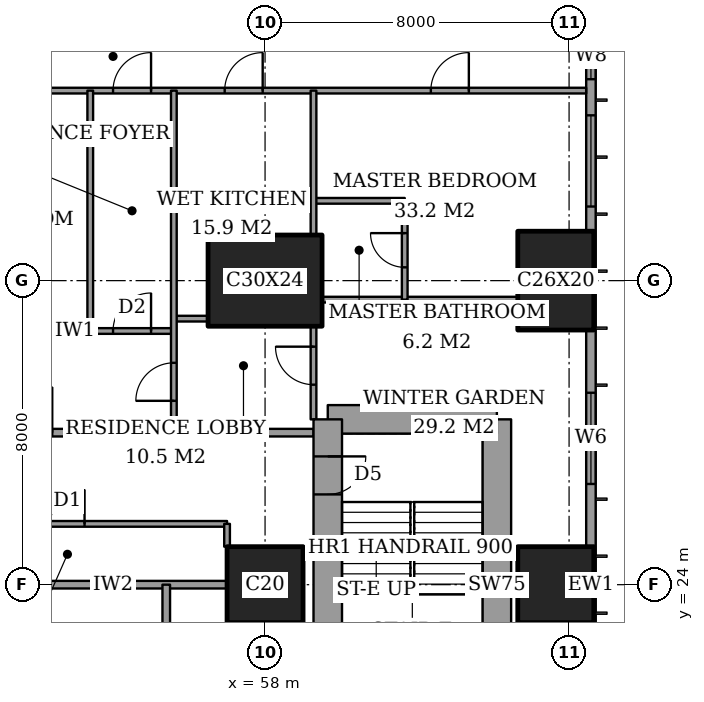
"""IFC4 building model, lengths in metres.
Left out: names, types, materials, properties, quantities, classifications, styles, units other than length and angle.
Written with IfcOpenShell. Run it as: python <this file> out.ifc"""

import sys

from ifc_helpers import new_model, si_unit, direction, frame, frame_2d, origin, origin_2d, place, context, subcontext, project, spatial, rectangle, extrude, element, fill, save


model = new_model("IFC4")
c1 = context("Model", 3, precision=1e-05, world=origin(), true_north=direction((0.0, 1.0)))
c2 = subcontext(c1, "Body", "Model", "MODEL_VIEW")
j1 = project(units=[si_unit("LENGTHUNIT", "METRE"), si_unit("PLANEANGLEUNIT", "RADIAN")], contexts=[c1])
p1 = place(None, origin())
s1 = spatial("IfcSite", under=j1, at=p1, CompositionType="ELEMENT")
p2 = place(p1, origin())
s2 = spatial("IfcBuilding", under=s1, at=p2, CompositionType="ELEMENT")
p3 = place(p2, frame((0.0, 0.0, 51.2)))
s3 = spatial("IfcBuildingStorey", under=s2, at=p3, CompositionType="ELEMENT", Elevation=51.2)
p4 = place(p3, frame((58.0, 24.0, 0.0), z_axis=(0.0, 0.0, 1.0), x_axis=(1.0, 0.0, 0.0)))
e1 = element("IfcColumn", 1, at=p4, inside=s3, PredefinedType="COLUMN", context=c2, shape_type="SweptSolid", body=[
    extrude(rectangle(XDim=2.0, YDim=2.0, at=origin_2d()), origin(), (0.0, 0.0, 1.0), 3.6),
])
p5 = place(p3, frame((58.0, 32.0, 0.0), z_axis=(0.0, 0.0, 1.0), x_axis=(1.0, 0.0, 0.0)))
e2 = element("IfcColumn", 2, at=p5, inside=s3, PredefinedType="COLUMN", context=c2, shape_type="SweptSolid", body=[
    extrude(rectangle(XDim=3.0, YDim=2.4, at=origin_2d()), origin(), (0.0, 0.0, 1.0), 3.6),
])
p6 = place(p3, frame((65.65, 24.0, 0.0), z_axis=(0.0, 0.0, 1.0), x_axis=(1.0, 0.0, 0.0)))
e3 = element("IfcColumn", 3, at=p6, inside=s3, PredefinedType="COLUMN", context=c2, shape_type="SweptSolid", body=[
    extrude(rectangle(XDim=2.0, YDim=2.0, at=origin_2d()), origin(), (0.0, 0.0, 1.0), 3.6),
])
p7 = place(p3, frame((65.65, 32.0, 0.0), z_axis=(0.0, 0.0, 1.0), x_axis=(0.0, 1.0, 0.0)))
e4 = element("IfcColumn", 4, at=p7, inside=s3, PredefinedType="COLUMN", context=c2, shape_type="SweptSolid", body=[
    extrude(rectangle(XDim=2.6, YDim=2.0, at=origin_2d()), origin(), (0.0, 0.0, 1.0), 3.6),
])
p8 = place(p3, frame((64.1, 19.65, 0.0), z_axis=(0.0, 0.0, 1.0), x_axis=(0.0, 1.0, 0.0)))
e5 = element("IfcWall", 5, at=p8, inside=s3, PredefinedType="SHEAR", context=c2, shape_type="SweptSolid", body=[
    extrude(rectangle(XDim=8.7, YDim=0.75, at=frame_2d((4.35, 0.0))), origin(), (0.0, 0.0, 1.0), 3.6),
])
p9 = place(p3, frame((64.1, 28.35, 0.0), z_axis=(0.0, 0.0, 1.0), x_axis=(-1.0, 0.0, 0.0)))
e6 = element("IfcWall", 6, at=p9, inside=s3, PredefinedType="SHEAR", context=c2, shape_type="SweptSolid", body=[
    extrude(rectangle(XDim=4.45, YDim=0.75, at=frame_2d((2.225, 0.0))), origin(), (0.0, 0.0, 1.0), 3.6),
])
p10 = place(p3, frame((59.65, 28.35, 0.0), z_axis=(0.0, 0.0, 1.0), x_axis=(0.0, -1.0, 0.0)))
e7 = element("IfcWall", 7, at=p10, inside=s3, PredefinedType="SHEAR", context=c2, shape_type="SweptSolid", body=[
    extrude(rectangle(XDim=8.7, YDim=0.75, at=frame_2d((4.35, 0.0))), origin(), (0.0, 0.0, 1.0), 3.6),
])
p11 = place(p10, frame((0.975, 0.0, 0.0)))
e8 = element("IfcOpeningElement", 8, at=p11, cuts=e7, PredefinedType="OPENING", context=c2, shape_type="SweptSolid", body=[
    extrude(rectangle(XDim=1.0, YDim=2.1, at=frame_2d((0.5, 1.05))), frame((0.0, 0.385, 0.0), z_axis=(0.0, -1.0, 0.0), x_axis=(1.0, 0.0, 0.0)), (0.0, 0.0, 1.0), 0.77),
])
p12 = place(p3, frame((66.575, 3.175, 0.0), z_axis=(0.0, 0.0, 1.0), x_axis=(0.0, 1.0, 0.0)))
e9 = element("IfcWall", 9, at=p12, inside=s3, PredefinedType="SOLIDWALL", context=c2, shape_type="SweptSolid", body=[
    extrude(rectangle(XDim=41.65, YDim=0.25, at=frame_2d((20.825, 0.0))), origin(), (0.0, 0.0, 1.0), 3.6),
])
p13 = place(p12, frame((0.775, 0.0, 0.6)))
e10 = element("IfcOpeningElement", 10, at=p13, cuts=e9, PredefinedType="OPENING", context=c2, shape_type="SweptSolid", body=[
    extrude(rectangle(XDim=2.4, YDim=2.0, at=frame_2d((1.2, 1.0))), frame((0.0, 0.135, 0.0), z_axis=(0.0, -1.0, 0.0), x_axis=(1.0, 0.0, 0.0)), (0.0, 0.0, 1.0), 0.27),
])
p14 = place(p12, frame((6.125, 0.0, 0.6)))
e11 = element("IfcOpeningElement", 11, at=p14, cuts=e9, PredefinedType="OPENING", context=c2, shape_type="SweptSolid", body=[
    extrude(rectangle(XDim=1.2, YDim=2.0, at=frame_2d((0.6, 1.0))), frame((0.0, 0.135, 0.0), z_axis=(0.0, -1.0, 0.0), x_axis=(1.0, 0.0, 0.0)), (0.0, 0.0, 1.0), 0.27),
])
p15 = place(p12, frame((8.375, 0.0, 0.6)))
e12 = element("IfcOpeningElement", 12, at=p15, cuts=e9, PredefinedType="OPENING", context=c2, shape_type="SweptSolid", body=[
    extrude(rectangle(XDim=2.4, YDim=2.0, at=frame_2d((1.2, 1.0))), frame((0.0, 0.135, 0.0), z_axis=(0.0, -1.0, 0.0), x_axis=(1.0, 0.0, 0.0)), (0.0, 0.0, 1.0), 0.27),
])
p16 = place(p12, frame((15.775, 0.0, 0.6)))
e13 = element("IfcOpeningElement", 13, at=p16, cuts=e9, PredefinedType="OPENING", context=c2, shape_type="SweptSolid", body=[
    extrude(rectangle(XDim=2.4, YDim=2.0, at=frame_2d((1.2, 1.0))), frame((0.0, 0.135, 0.0), z_axis=(0.0, -1.0, 0.0), x_axis=(1.0, 0.0, 0.0)), (0.0, 0.0, 1.0), 0.27),
])
p17 = place(p12, frame((23.475, 0.0, 0.6)))
e14 = element("IfcOpeningElement", 14, at=p17, cuts=e9, PredefinedType="OPENING", context=c2, shape_type="SweptSolid", body=[
    extrude(rectangle(XDim=2.4, YDim=2.0, at=frame_2d((1.2, 1.0))), frame((0.0, 0.135, 0.0), z_axis=(0.0, -1.0, 0.0), x_axis=(1.0, 0.0, 0.0)), (0.0, 0.0, 1.0), 0.27),
])
p18 = place(p12, frame((30.775, 0.0, 0.6)))
e15 = element("IfcOpeningElement", 15, at=p18, cuts=e9, PredefinedType="OPENING", context=c2, shape_type="SweptSolid", body=[
    extrude(rectangle(XDim=2.4, YDim=2.0, at=frame_2d((1.2, 1.0))), frame((0.0, 0.135, 0.0), z_axis=(0.0, -1.0, 0.0), x_axis=(1.0, 0.0, 0.0)), (0.0, 0.0, 1.0), 0.27),
])
p19 = place(p12, frame((34.125, 0.0, 0.6)))
e16 = element("IfcOpeningElement", 16, at=p19, cuts=e9, PredefinedType="OPENING", context=c2, shape_type="SweptSolid", body=[
    extrude(rectangle(XDim=1.2, YDim=2.0, at=frame_2d((0.6, 1.0))), frame((0.0, 0.135, 0.0), z_axis=(0.0, -1.0, 0.0), x_axis=(1.0, 0.0, 0.0)), (0.0, 0.0, 1.0), 0.27),
])
p20 = place(p12, frame((38.475, 0.0, 0.6)))
e17 = element("IfcOpeningElement", 17, at=p20, cuts=e9, PredefinedType="OPENING", context=c2, shape_type="SweptSolid", body=[
    extrude(rectangle(XDim=2.4, YDim=2.0, at=frame_2d((1.2, 1.0))), frame((0.0, 0.135, 0.0), z_axis=(0.0, -1.0, 0.0), x_axis=(1.0, 0.0, 0.0)), (0.0, 0.0, 1.0), 0.27),
])
p21 = place(p3, frame((51.0, 24.0, 0.0), z_axis=(0.0, 0.0, 1.0), x_axis=(1.0, 0.0, 0.0)))
e18 = element("IfcWall", 18, at=p21, inside=s3, PredefinedType="PARTITIONING", context=c2, shape_type="SweptSolid", body=[
    extrude(rectangle(XDim=6.0, YDim=0.2, at=frame_2d((3.0, 0.0))), origin(), (0.0, 0.0, 1.0), 3.35),
])
p22 = place(p3, frame((48.6, 25.6, 0.0), z_axis=(0.0, 0.0, 1.0), x_axis=(1.0, 0.0, 0.0)))
e19 = element("IfcWall", 19, at=p22, inside=s3, PredefinedType="PARTITIONING", context=c2, shape_type="SweptSolid", body=[
    extrude(rectangle(XDim=8.4, YDim=0.15, at=frame_2d((4.2, 0.0))), origin(), (0.0, 0.0, 1.0), 3.35),
])
p23 = place(p22, frame((3.75, 0.0, 0.0)))
e20 = element("IfcOpeningElement", 20, at=p23, cuts=e19, PredefinedType="OPENING", context=c2, shape_type="SweptSolid", body=[
    extrude(rectangle(XDim=0.9, YDim=2.1, at=frame_2d((0.45, 1.05))), frame((0.0, 0.085, 0.0), z_axis=(0.0, -1.0, 0.0), x_axis=(1.0, 0.0, 0.0)), (0.0, 0.0, 1.0), 0.17),
])
p24 = place(p3, frame((42.0, 28.0, 0.0), z_axis=(0.0, 0.0, 1.0), x_axis=(1.0, 0.0, 0.0)))
e21 = element("IfcWall", 21, at=p24, inside=s3, PredefinedType="PARTITIONING", context=c2, shape_type="SweptSolid", body=[
    extrude(rectangle(XDim=17.275, YDim=0.2, at=frame_2d((8.637, 0.0))), origin(), (0.0, 0.0, 1.0), 3.35),
])
p25 = place(p24, frame((9.2, 0.0, 0.0)))
e22 = element("IfcOpeningElement", 22, at=p25, cuts=e21, PredefinedType="OPENING", context=c2, shape_type="SweptSolid", body=[
    extrude(rectangle(XDim=1.2, YDim=2.4, at=frame_2d((0.6, 1.2))), frame((0.0, 0.11, 0.0), z_axis=(0.0, -1.0, 0.0), x_axis=(1.0, 0.0, 0.0)), (0.0, 0.0, 1.0), 0.22),
])
p26 = place(p3, frame((51.6, 30.675, 0.0), z_axis=(0.0, 0.0, 1.0), x_axis=(1.0, 0.0, 0.0)))
e23 = element("IfcWall", 23, at=p26, inside=s3, PredefinedType="PARTITIONING", context=c2, shape_type="SweptSolid", body=[
    extrude(rectangle(XDim=4.0, YDim=0.15, at=frame_2d((2.0, 0.0))), origin(), (0.0, 0.0, 1.0), 3.35),
])
p27 = place(p26, frame((2.4, 0.0, 0.0)))
e24 = element("IfcOpeningElement", 24, at=p27, cuts=e23, PredefinedType="OPENING", context=c2, shape_type="SweptSolid", body=[
    extrude(rectangle(XDim=1.0, YDim=2.1, at=frame_2d((0.5, 1.05))), frame((0.0, 0.085, 0.0), z_axis=(0.0, -1.0, 0.0), x_axis=(1.0, 0.0, 0.0)), (0.0, 0.0, 1.0), 0.17),
])
p28 = place(p3, frame((55.6, 31.0, 0.0), z_axis=(0.0, 0.0, 1.0), x_axis=(1.0, 0.0, 0.0)))
e25 = element("IfcWall", 25, at=p28, inside=s3, PredefinedType="PARTITIONING", context=c2, shape_type="SweptSolid", body=[
    extrude(rectangle(XDim=0.9, YDim=0.15, at=frame_2d((0.45, 0.0))), origin(), (0.0, 0.0, 1.0), 3.35),
])
p29 = place(p3, frame((59.5, 31.5, 0.0), z_axis=(0.0, 0.0, 1.0), x_axis=(1.0, 0.0, 0.0)))
e26 = element("IfcWall", 26, at=p29, inside=s3, PredefinedType="PARTITIONING", context=c2, shape_type="SweptSolid", body=[
    extrude(rectangle(XDim=5.15, YDim=0.15, at=frame_2d((2.575, 0.0))), origin(), (0.0, 0.0, 1.0), 3.35),
])
p30 = place(p3, frame((59.275, 34.1, 0.0), z_axis=(0.0, 0.0, 1.0), x_axis=(1.0, 0.0, 0.0)))
e27 = element("IfcWall", 27, at=p30, inside=s3, PredefinedType="PARTITIONING", context=c2, shape_type="SweptSolid", body=[
    extrude(rectangle(XDim=2.4, YDim=0.15, at=frame_2d((1.2, 0.0))), origin(), (0.0, 0.0, 1.0), 3.35),
])
p31 = place(p3, frame((41.439, 37.0, 0.0), z_axis=(0.0, 0.0, 1.0), x_axis=(1.0, 0.0, 0.0)))
e28 = element("IfcWall", 28, at=p31, inside=s3, PredefinedType="PARTITIONING", context=c2, shape_type="SweptSolid", body=[
    extrude(rectangle(XDim=25.011, YDim=0.15, at=frame_2d((12.505, 0.0))), origin(), (0.0, 0.0, 1.0), 3.35),
])
p32 = place(p31, frame((12.561, 0.0, 0.0)))
e29 = element("IfcOpeningElement", 29, at=p32, cuts=e28, PredefinedType="OPENING", context=c2, shape_type="SweptSolid", body=[
    extrude(rectangle(XDim=1.0, YDim=2.1, at=frame_2d((0.5, 1.05))), frame((0.0, 0.085, 0.0), z_axis=(0.0, -1.0, 0.0), x_axis=(1.0, 0.0, 0.0)), (0.0, 0.0, 1.0), 0.17),
])
p33 = place(p31, frame((20.924, 0.0, 0.0)))
e30 = element("IfcOpeningElement", 30, at=p33, cuts=e28, PredefinedType="OPENING", context=c2, shape_type="SweptSolid", body=[
    extrude(rectangle(XDim=1.0, YDim=2.1, at=frame_2d((0.5, 1.05))), frame((0.0, 0.085, 0.0), z_axis=(0.0, -1.0, 0.0), x_axis=(1.0, 0.0, 0.0)), (0.0, 0.0, 1.0), 0.17),
])
p34 = place(p31, frame((15.499, 0.0, 0.0)))
e31 = element("IfcOpeningElement", 31, at=p34, cuts=e28, PredefinedType="OPENING", context=c2, shape_type="SweptSolid", body=[
    extrude(rectangle(XDim=1.0, YDim=2.1, at=frame_2d((0.5, 1.05))), frame((0.0, 0.085, 0.0), z_axis=(0.0, -1.0, 0.0), x_axis=(1.0, 0.0, 0.0)), (0.0, 0.0, 1.0), 0.17),
])
p35 = place(p31, frame((8.761, 0.0, 0.0)))
e32 = element("IfcOpeningElement", 32, at=p35, cuts=e28, PredefinedType="OPENING", context=c2, shape_type="SweptSolid", body=[
    extrude(rectangle(XDim=1.0, YDim=2.1, at=frame_2d((0.5, 1.05))), frame((0.0, 0.085, 0.0), z_axis=(0.0, -1.0, 0.0), x_axis=(1.0, 0.0, 0.0)), (0.0, 0.0, 1.0), 0.17),
])
p36 = place(p31, frame((2.836, 0.0, 0.0)))
e33 = element("IfcOpeningElement", 33, at=p36, cuts=e28, PredefinedType="OPENING", context=c2, shape_type="SweptSolid", body=[
    extrude(rectangle(XDim=1.0, YDim=2.1, at=frame_2d((0.5, 1.05))), frame((0.0, 0.085, 0.0), z_axis=(0.0, -1.0, 0.0), x_axis=(1.0, 0.0, 0.0)), (0.0, 0.0, 1.0), 0.17),
])
p37 = place(p3, frame((53.4, 30.675, 0.0), z_axis=(0.0, 0.0, 1.0), x_axis=(0.0, 1.0, 0.0)))
e34 = element("IfcWall", 34, at=p37, inside=s3, PredefinedType="PARTITIONING", context=c2, shape_type="SweptSolid", body=[
    extrude(rectangle(XDim=6.325, YDim=0.15, at=frame_2d((3.163, 0.0))), origin(), (0.0, 0.0, 1.0), 3.35),
])
p38 = place(p3, frame((55.4, 21.6, 0.0), z_axis=(0.0, 0.0, 1.0), x_axis=(0.0, 1.0, 0.0)))
e35 = element("IfcWall", 35, at=p38, inside=s3, PredefinedType="PARTITIONING", context=c2, shape_type="SweptSolid", body=[
    extrude(rectangle(XDim=2.4, YDim=0.2, at=frame_2d((1.2, 0.0))), origin(), (0.0, 0.0, 1.0), 3.35),
])
p39 = place(p3, frame((55.6, 28.0, 0.0), z_axis=(0.0, 0.0, 1.0), x_axis=(0.0, 1.0, 0.0)))
e36 = element("IfcWall", 36, at=p39, inside=s3, PredefinedType="PARTITIONING", context=c2, shape_type="SweptSolid", body=[
    extrude(rectangle(XDim=9.0, YDim=0.15, at=frame_2d((4.5, 0.0))), origin(), (0.0, 0.0, 1.0), 3.35),
])
p40 = place(p39, frame((0.837, 0.0, 0.0)))
e37 = element("IfcOpeningElement", 37, at=p40, cuts=e36, PredefinedType="OPENING", context=c2, shape_type="SweptSolid", body=[
    extrude(rectangle(XDim=1.0, YDim=2.1, at=frame_2d((0.5, 1.05))), frame((0.0, 0.085, 0.0), z_axis=(0.0, -1.0, 0.0), x_axis=(1.0, 0.0, 0.0)), (0.0, 0.0, 1.0), 0.17),
])
p41 = place(p3, frame((57.0, 25.0, 0.0), z_axis=(0.0, 0.0, 1.0), x_axis=(0.0, 1.0, 0.0)))
e38 = element("IfcWall", 38, at=p41, inside=s3, PredefinedType="PARTITIONING", context=c2, shape_type="SweptSolid", body=[
    extrude(rectangle(XDim=0.6, YDim=0.15, at=frame_2d((0.3, 0.0))), origin(), (0.0, 0.0, 1.0), 3.35),
])
p42 = place(p3, frame((59.275, 28.35, 0.0), z_axis=(0.0, 0.0, 1.0), x_axis=(0.0, 1.0, 0.0)))
e39 = element("IfcWall", 39, at=p42, inside=s3, PredefinedType="PARTITIONING", context=c2, shape_type="SweptSolid", body=[
    extrude(rectangle(XDim=2.45, YDim=0.15, at=frame_2d((1.225, 0.0))), origin(), (0.0, 0.0, 1.0), 3.35),
])
p43 = place(p42, frame((0.913, 0.0, 0.0)))
e40 = element("IfcOpeningElement", 40, at=p43, cuts=e39, PredefinedType="OPENING", context=c2, shape_type="SweptSolid", body=[
    extrude(rectangle(XDim=1.0, YDim=2.1, at=frame_2d((0.5, 1.05))), frame((0.0, 0.085, 0.0), z_axis=(0.0, -1.0, 0.0), x_axis=(1.0, 0.0, 0.0)), (0.0, 0.0, 1.0), 0.17),
])
p44 = place(p3, frame((59.275, 33.2, 0.0), z_axis=(0.0, 0.0, 1.0), x_axis=(0.0, 1.0, 0.0)))
e41 = element("IfcWall", 41, at=p44, inside=s3, PredefinedType="PARTITIONING", context=c2, shape_type="SweptSolid", body=[
    extrude(rectangle(XDim=3.8, YDim=0.15, at=frame_2d((1.9, 0.0))), origin(), (0.0, 0.0, 1.0), 3.35),
])
p45 = place(p3, frame((61.675, 31.5, 0.0), z_axis=(0.0, 0.0, 1.0), x_axis=(0.0, 1.0, 0.0)))
e42 = element("IfcWall", 42, at=p45, inside=s3, PredefinedType="PARTITIONING", context=c2, shape_type="SweptSolid", body=[
    extrude(rectangle(XDim=2.6, YDim=0.15, at=frame_2d((1.3, 0.0))), origin(), (0.0, 0.0, 1.0), 3.35),
])
p46 = place(p45, frame((0.85, 0.0, 0.0)))
e43 = element("IfcOpeningElement", 43, at=p46, cuts=e42, PredefinedType="OPENING", context=c2, shape_type="SweptSolid", body=[
    extrude(rectangle(XDim=0.9, YDim=2.1, at=frame_2d((0.45, 1.05))), frame((0.0, 0.085, 0.0), z_axis=(0.0, -1.0, 0.0), x_axis=(1.0, 0.0, 0.0)), (0.0, 0.0, 1.0), 0.17),
])
p47 = place(p17, origin())
e44 = element("IfcWindow", 44, at=p47, inside=s3, PartitioningType="SINGLE_PANEL", PredefinedType="WINDOW", context=c2, shape_type="SweptSolid", body=[
    extrude(rectangle(XDim=2.4, YDim=2.0, at=frame_2d((1.2, 1.0))), frame((0.0, 0.03, 0.0), z_axis=(0.0, -1.0, 0.0), x_axis=(1.0, 0.0, 0.0)), (0.0, 0.0, 1.0), 0.06),
])
fill(e14, e44)
p48 = place(p18, origin())
e45 = element("IfcWindow", 45, at=p48, inside=s3, PartitioningType="SINGLE_PANEL", PredefinedType="WINDOW", context=c2, shape_type="SweptSolid", body=[
    extrude(rectangle(XDim=2.4, YDim=2.0, at=frame_2d((1.2, 1.0))), frame((0.0, 0.03, 0.0), z_axis=(0.0, -1.0, 0.0), x_axis=(1.0, 0.0, 0.0)), (0.0, 0.0, 1.0), 0.06),
])
fill(e15, e45)
p49 = place(p19, origin())
e46 = element("IfcWindow", 46, at=p49, inside=s3, PartitioningType="SINGLE_PANEL", PredefinedType="WINDOW", context=c2, shape_type="SweptSolid", body=[
    extrude(rectangle(XDim=1.2, YDim=2.0, at=frame_2d((0.6, 1.0))), frame((0.0, 0.03, 0.0), z_axis=(0.0, -1.0, 0.0), x_axis=(1.0, 0.0, 0.0)), (0.0, 0.0, 1.0), 0.06),
])
fill(e16, e46)
p50 = place(p32, origin())
e47 = element("IfcDoor", 47, at=p50, inside=s3, OperationType="SINGLE_SWING_LEFT", PredefinedType="DOOR", context=c2, shape_type="SweptSolid", body=[
    extrude(rectangle(XDim=1.0, YDim=2.1, at=frame_2d((0.5, 1.05))), frame((0.0, 0.025, 0.0), z_axis=(0.0, -1.0, 0.0), x_axis=(1.0, 0.0, 0.0)), (0.0, 0.0, 1.0), 0.05),
])
fill(e29, e47)
p51 = place(p46, origin())
e48 = element("IfcDoor", 48, at=p51, inside=s3, OperationType="SINGLE_SWING_LEFT", PredefinedType="DOOR", context=c2, shape_type="SweptSolid", body=[
    extrude(rectangle(XDim=0.9, YDim=2.1, at=frame_2d((0.45, 1.05))), frame((0.0, 0.025, 0.0), z_axis=(0.0, -1.0, 0.0), x_axis=(1.0, 0.0, 0.0)), (0.0, 0.0, 1.0), 0.05),
])
fill(e43, e48)
p52 = place(p33, origin())
e49 = element("IfcDoor", 49, at=p52, inside=s3, OperationType="SINGLE_SWING_LEFT", PredefinedType="DOOR", context=c2, shape_type="SweptSolid", body=[
    extrude(rectangle(XDim=1.0, YDim=2.1, at=frame_2d((0.5, 1.05))), frame((0.0, 0.025, 0.0), z_axis=(0.0, -1.0, 0.0), x_axis=(1.0, 0.0, 0.0)), (0.0, 0.0, 1.0), 0.05),
])
fill(e30, e49)
p53 = place(p43, origin())
e50 = element("IfcDoor", 50, at=p53, inside=s3, OperationType="SINGLE_SWING_LEFT", PredefinedType="DOOR", context=c2, shape_type="SweptSolid", body=[
    extrude(rectangle(XDim=1.0, YDim=2.1, at=frame_2d((0.5, 1.05))), frame((0.0, 0.025, 0.0), z_axis=(0.0, -1.0, 0.0), x_axis=(1.0, 0.0, 0.0)), (0.0, 0.0, 1.0), 0.05),
])
fill(e40, e50)
p54 = place(p34, origin())
e51 = element("IfcDoor", 51, at=p54, inside=s3, OperationType="SINGLE_SWING_LEFT", PredefinedType="DOOR", context=c2, shape_type="SweptSolid", body=[
    extrude(rectangle(XDim=1.0, YDim=2.1, at=frame_2d((0.5, 1.05))), frame((0.0, 0.025, 0.0), z_axis=(0.0, -1.0, 0.0), x_axis=(1.0, 0.0, 0.0)), (0.0, 0.0, 1.0), 0.05),
])
fill(e31, e51)
p55 = place(p40, origin())
e52 = element("IfcDoor", 52, at=p55, inside=s3, OperationType="SINGLE_SWING_RIGHT", PredefinedType="DOOR", context=c2, shape_type="SweptSolid", body=[
    extrude(rectangle(XDim=1.0, YDim=2.1, at=frame_2d((0.5, 1.05))), frame((0.0, 0.025, 0.0), z_axis=(0.0, -1.0, 0.0), x_axis=(1.0, 0.0, 0.0)), (0.0, 0.0, 1.0), 0.05),
])
fill(e37, e52)
p56 = place(p25, origin())
e53 = element("IfcDoor", 53, at=p56, inside=s3, OperationType="SINGLE_SWING_LEFT", PredefinedType="DOOR", context=c2, shape_type="SweptSolid", body=[
    extrude(rectangle(XDim=1.2, YDim=2.4, at=frame_2d((0.6, 1.2))), frame((0.0, 0.025, 0.0), z_axis=(0.0, -1.0, 0.0), x_axis=(1.0, 0.0, 0.0)), (0.0, 0.0, 1.0), 0.05),
])
fill(e22, e53)
p57 = place(p27, origin())
e54 = element("IfcDoor", 54, at=p57, inside=s3, OperationType="SINGLE_SWING_LEFT", PredefinedType="DOOR", context=c2, shape_type="SweptSolid", body=[
    extrude(rectangle(XDim=1.0, YDim=2.1, at=frame_2d((0.5, 1.05))), frame((0.0, 0.025, 0.0), z_axis=(0.0, -1.0, 0.0), x_axis=(1.0, 0.0, 0.0)), (0.0, 0.0, 1.0), 0.05),
])
fill(e24, e54)
p58 = place(p23, origin())
e55 = element("IfcDoor", 55, at=p58, inside=s3, OperationType="SINGLE_SWING_LEFT", PredefinedType="DOOR", context=c2, shape_type="SweptSolid", body=[
    extrude(rectangle(XDim=0.9, YDim=2.1, at=frame_2d((0.45, 1.05))), frame((0.0, 0.025, 0.0), z_axis=(0.0, -1.0, 0.0), x_axis=(1.0, 0.0, 0.0)), (0.0, 0.0, 1.0), 0.05),
])
fill(e20, e55)
p59 = place(p11, origin())
e56 = element("IfcDoor", 56, at=p59, inside=s3, OperationType="SINGLE_SWING_RIGHT", PredefinedType="DOOR", context=c2, shape_type="SweptSolid", body=[
    extrude(rectangle(XDim=1.0, YDim=2.1, at=frame_2d((0.5, 1.05))), frame((0.0, 0.025, 0.0), z_axis=(0.0, -1.0, 0.0), x_axis=(1.0, 0.0, 0.0)), (0.0, 0.0, 1.0), 0.05),
])
fill(e8, e56)
save(model, sys.argv[1])
